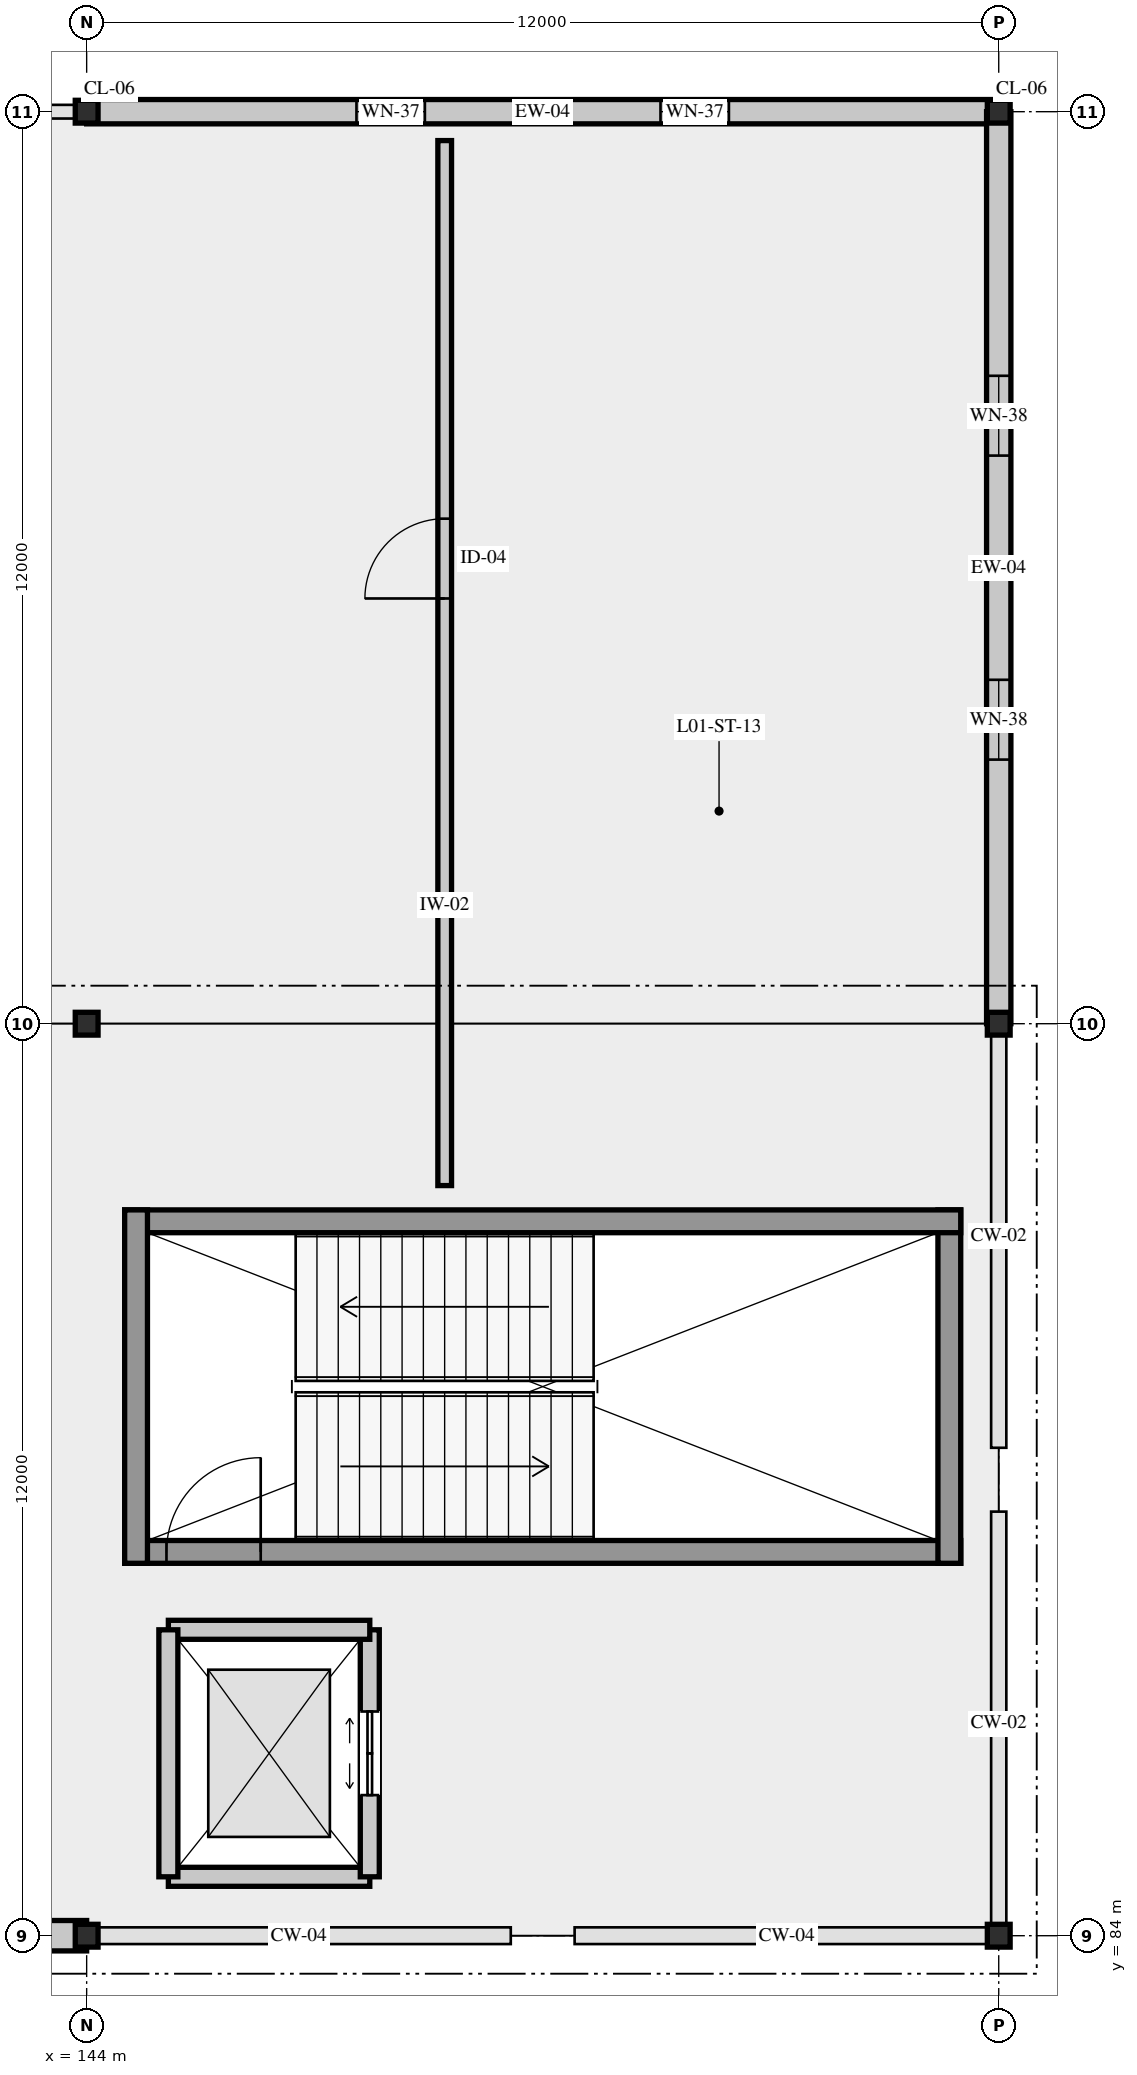
"""IFC4 building model, lengths in metres.
Left out: names, types, materials, properties, quantities, classifications, styles, units other than length and angle.
Written with IfcOpenShell. Run it as: python <this file> out.ifc"""

import sys

from ifc_helpers import new_model, si_unit, direction, frame, frame_2d, origin, origin_2d, place, context, subcontext, project, spatial, rectangle, i_section, extrude, element, fill, save


model = new_model("IFC4")
c1 = context("Model", 3, precision=1e-05, world=origin(), true_north=direction((0.0, 1.0)))
c2 = subcontext(c1, "Body", "Model", "MODEL_VIEW")
j1 = project(units=[si_unit("LENGTHUNIT", "METRE"), si_unit("PLANEANGLEUNIT", "RADIAN")], contexts=[c1])
p1 = place(None, origin())
s1 = spatial("IfcSite", under=j1, at=p1, CompositionType="ELEMENT")
p2 = place(p1, origin())
s2 = spatial("IfcBuilding", under=s1, at=p2, CompositionType="ELEMENT")
p3 = place(p2, frame((0.0, 0.0, 5.4)))
s3 = spatial("IfcBuildingStorey", under=s2, at=p3, CompositionType="ELEMENT", Elevation=5.4)
for number, where, z_axis, x_axis in (
    (1, (144.0, 84.0, 0.0), (0.0, 0.0, 1.0), (1.0, 0.0, 0.0)),
    (2, (144.0, 96.0, 0.0), (0.0, 0.0, 1.0), (1.0, 0.0, 0.0)),
    (3, (144.0, 108.0, 0.0), (0.0, 0.0, 1.0), (1.0, 0.0, 0.0)),
    (4, (156.0, 84.0, 0.0), (0.0, 0.0, 1.0), (1.0, 0.0, 0.0)),
    (5, (156.0, 96.0, 0.0), (0.0, 0.0, 1.0), (1.0, 0.0, 0.0)),
    (6, (156.0, 108.0, 0.0), (0.0, 0.0, 1.0), (1.0, 0.0, 0.0)),
):
    element("IfcColumn", number, at=place(p3, frame(where, z_axis=z_axis, x_axis=x_axis)), inside=s3, PredefinedType="COLUMN", context=c2, shape_type="SweptSolid", body=[
        extrude(i_section(OverallWidth=0.3, OverallDepth=0.3, WebThickness=0.011, FlangeThickness=0.019, FilletRadius=0.027, at=origin_2d()), origin(), (0.0, 0.0, 1.0), 5.4),
    ])
p4 = place(p3, frame((132.0, 84.0, 0.0), z_axis=(0.0, 0.0, 1.0), x_axis=(1.0, 0.0, 0.0)))
e7 = element("IfcWall", 7, at=p4, inside=s3, PredefinedType="SOLIDWALL", context=c2, shape_type="SweptSolid", body=[
    extrude(rectangle(XDim=12.0, YDim=0.4, at=frame_2d((6.0, 0.0))), origin(), (0.0, 0.0, 1.0), 4.53),
])
p5 = place(p4, frame((4.5, 0.0, 0.95)))
e8 = element("IfcOpeningElement", 8, at=p5, cuts=e7, PredefinedType="OPENING", context=c2, shape_type="SweptSolid", body=[
    extrude(rectangle(XDim=3.0, YDim=2.1, at=frame_2d((1.5, 1.05))), frame((0.0, 0.21, 0.0), z_axis=(0.0, -1.0, 0.0), x_axis=(1.0, 0.0, 0.0)), (0.0, 0.0, 1.0), 0.42),
])
p6 = place(p3, frame((156.0, 108.0, 0.0), z_axis=(0.0, 0.0, 1.0), x_axis=(-1.0, 0.0, 0.0)))
e9 = element("IfcWall", 9, at=p6, inside=s3, PredefinedType="SOLIDWALL", context=c2, shape_type="SweptSolid", body=[
    extrude(rectangle(XDim=12.0, YDim=0.32, at=frame_2d((6.0, 0.0))), origin(), (0.0, 0.0, 1.0), 4.53),
])
p7 = place(p6, frame((3.55, 0.0, 0.95)))
e10 = element("IfcOpeningElement", 10, at=p7, cuts=e9, PredefinedType="OPENING", context=c2, shape_type="SweptSolid", body=[
    extrude(rectangle(XDim=0.9, YDim=2.4, at=frame_2d((0.45, 1.2))), frame((0.0, 0.17, 0.0), z_axis=(0.0, -1.0, 0.0), x_axis=(1.0, 0.0, 0.0)), (0.0, 0.0, 1.0), 0.34),
])
p8 = place(p6, frame((7.55, 0.0, 0.95)))
e11 = element("IfcOpeningElement", 11, at=p8, cuts=e9, PredefinedType="OPENING", context=c2, shape_type="SweptSolid", body=[
    extrude(rectangle(XDim=0.9, YDim=2.4, at=frame_2d((0.45, 1.2))), frame((0.0, 0.17, 0.0), z_axis=(0.0, -1.0, 0.0), x_axis=(1.0, 0.0, 0.0)), (0.0, 0.0, 1.0), 0.34),
])
p9 = place(p3, frame((156.0, 96.0, 0.0), z_axis=(0.0, 0.0, 1.0), x_axis=(0.0, 1.0, 0.0)))
e12 = element("IfcWall", 12, at=p9, inside=s3, PredefinedType="SOLIDWALL", context=c2, shape_type="SweptSolid", body=[
    extrude(rectangle(XDim=12.0, YDim=0.32, at=frame_2d((6.0, 0.0))), origin(), (0.0, 0.0, 1.0), 4.53),
])
p10 = place(p9, frame((3.475, 0.0, 0.95)))
e13 = element("IfcOpeningElement", 13, at=p10, cuts=e12, PredefinedType="OPENING", context=c2, shape_type="SweptSolid", body=[
    extrude(rectangle(XDim=1.05, YDim=2.4, at=frame_2d((0.525, 1.2))), frame((0.0, 0.17, 0.0), z_axis=(0.0, -1.0, 0.0), x_axis=(1.0, 0.0, 0.0)), (0.0, 0.0, 1.0), 0.34),
])
p11 = place(p9, frame((7.475, 0.0, 0.95)))
e14 = element("IfcOpeningElement", 14, at=p11, cuts=e12, PredefinedType="OPENING", context=c2, shape_type="SweptSolid", body=[
    extrude(rectangle(XDim=1.05, YDim=2.4, at=frame_2d((0.525, 1.2))), frame((0.0, 0.17, 0.0), z_axis=(0.0, -1.0, 0.0), x_axis=(1.0, 0.0, 0.0)), (0.0, 0.0, 1.0), 0.34),
])
p12 = place(p3, frame((144.5, 89.05, 0.0), z_axis=(0.0, 0.0, 1.0), x_axis=(1.0, 0.0, 0.0)))
e15 = element("IfcWall", 15, at=p12, inside=s3, PredefinedType="SHEAR", context=c2, shape_type="SweptSolid", body=[
    extrude(rectangle(XDim=11.0, YDim=0.3, at=frame_2d((5.5, 0.0))), origin(), (0.0, 0.0, 1.0), 5.11),
])
p13 = place(p12, frame((0.55, 0.0, 0.0)))
e16 = element("IfcOpeningElement", 16, at=p13, cuts=e15, PredefinedType="OPENING", context=c2, shape_type="SweptSolid", body=[
    extrude(rectangle(XDim=1.24, YDim=2.25, at=frame_2d((0.62, 1.125))), frame((0.0, 0.16, 0.0), z_axis=(0.0, -1.0, 0.0), x_axis=(1.0, 0.0, 0.0)), (0.0, 0.0, 1.0), 0.32),
])
p14 = place(p3, frame((155.35, 88.9, 0.0), z_axis=(0.0, 0.0, 1.0), x_axis=(0.0, 1.0, 0.0)))
e17 = element("IfcWall", 17, at=p14, inside=s3, PredefinedType="SHEAR", context=c2, shape_type="SweptSolid", body=[
    extrude(rectangle(XDim=4.65, YDim=0.3, at=frame_2d((2.325, 0.0))), origin(), (0.0, 0.0, 1.0), 5.11),
])
p15 = place(p3, frame((155.5, 93.4, 0.0), z_axis=(0.0, 0.0, 1.0), x_axis=(-1.0, 0.0, 0.0)))
e18 = element("IfcWall", 18, at=p15, inside=s3, PredefinedType="SHEAR", context=c2, shape_type="SweptSolid", body=[
    extrude(rectangle(XDim=11.0, YDim=0.3, at=frame_2d((5.5, 0.0))), origin(), (0.0, 0.0, 1.0), 5.11),
])
p16 = place(p3, frame((144.65, 93.55, 0.0), z_axis=(0.0, 0.0, 1.0), x_axis=(0.0, -1.0, 0.0)))
e19 = element("IfcWall", 19, at=p16, inside=s3, PredefinedType="SHEAR", context=c2, shape_type="SweptSolid", body=[
    extrude(rectangle(XDim=4.65, YDim=0.3, at=frame_2d((2.325, 0.0))), origin(), (0.0, 0.0, 1.0), 5.11),
])
p17 = place(p3, frame((145.075, 84.775, 0.0), z_axis=(0.0, 0.0, 1.0), x_axis=(1.0, 0.0, 0.0)))
e20 = element("IfcWall", 20, at=p17, inside=s3, PredefinedType="SOLIDWALL", context=c2, shape_type="SweptSolid", body=[
    extrude(rectangle(XDim=2.65, YDim=0.25, at=frame_2d((1.325, 0.0))), origin(), (0.0, 0.0, 1.0), 5.11),
])
p18 = place(p3, frame((147.725, 84.775, 0.0), z_axis=(0.0, 0.0, 1.0), x_axis=(0.0, 1.0, 0.0)))
e21 = element("IfcWall", 21, at=p18, inside=s3, PredefinedType="SOLIDWALL", context=c2, shape_type="SweptSolid", body=[
    extrude(rectangle(XDim=3.25, YDim=0.25, at=frame_2d((1.625, 0.0))), origin(), (0.0, 0.0, 1.0), 5.11),
])
p19 = place(p18, frame((1.075, 0.0, 0.0)))
e22 = element("IfcOpeningElement", 22, at=p19, cuts=e21, PredefinedType="OPENING", context=c2, shape_type="SweptSolid", body=[
    extrude(rectangle(XDim=1.1, YDim=2.2, at=frame_2d((0.55, 1.1))), frame((0.0, 0.135, 0.0), z_axis=(0.0, -1.0, 0.0), x_axis=(1.0, 0.0, 0.0)), (0.0, 0.0, 1.0), 0.27),
])
p20 = place(p3, frame((147.725, 88.025, 0.0), z_axis=(0.0, 0.0, 1.0), x_axis=(-1.0, 0.0, 0.0)))
e23 = element("IfcWall", 23, at=p20, inside=s3, PredefinedType="SOLIDWALL", context=c2, shape_type="SweptSolid", body=[
    extrude(rectangle(XDim=2.65, YDim=0.25, at=frame_2d((1.325, 0.0))), origin(), (0.0, 0.0, 1.0), 5.11),
])
p21 = place(p3, frame((145.075, 88.025, 0.0), z_axis=(0.0, 0.0, 1.0), x_axis=(0.0, -1.0, 0.0)))
e24 = element("IfcWall", 24, at=p21, inside=s3, PredefinedType="SOLIDWALL", context=c2, shape_type="SweptSolid", body=[
    extrude(rectangle(XDim=3.25, YDim=0.25, at=frame_2d((1.625, 0.0))), origin(), (0.0, 0.0, 1.0), 5.11),
])
p22 = place(p3, frame((148.711, 93.87, 0.0), z_axis=(0.0, 0.0, 1.0), x_axis=(0.0, 1.0, 0.0)))
e25 = element("IfcWall", 25, at=p22, inside=s3, PredefinedType="PARTITIONING", context=c2, shape_type="SweptSolid", body=[
    extrude(rectangle(XDim=13.75, YDim=0.18, at=frame_2d((6.875, 0.0))), origin(), (0.0, 0.0, 1.0), 4.55),
])
p23 = place(p22, frame((7.725, 0.0, 0.0)))
e26 = element("IfcOpeningElement", 26, at=p23, cuts=e25, PredefinedType="OPENING", context=c2, shape_type="SweptSolid", body=[
    extrude(rectangle(XDim=1.05, YDim=2.2, at=frame_2d((0.525, 1.1))), frame((0.0, 0.1, 0.0), z_axis=(0.0, -1.0, 0.0), x_axis=(1.0, 0.0, 0.0)), (0.0, 0.0, 1.0), 0.2),
])
p24 = place(p7, origin())
e27 = element("IfcWindow", 27, at=p24, inside=s3, PartitioningType="SINGLE_PANEL", PredefinedType="WINDOW", context=c2, shape_type="SweptSolid", body=[
    extrude(rectangle(XDim=0.9, YDim=2.4, at=frame_2d((0.45, 1.2))), frame((0.0, 0.03, 0.0), z_axis=(0.0, -1.0, 0.0), x_axis=(1.0, 0.0, 0.0)), (0.0, 0.0, 1.0), 0.06),
])
fill(e10, e27)
p25 = place(p8, origin())
e28 = element("IfcWindow", 28, at=p25, inside=s3, PartitioningType="SINGLE_PANEL", PredefinedType="WINDOW", context=c2, shape_type="SweptSolid", body=[
    extrude(rectangle(XDim=0.9, YDim=2.4, at=frame_2d((0.45, 1.2))), frame((0.0, 0.03, 0.0), z_axis=(0.0, -1.0, 0.0), x_axis=(1.0, 0.0, 0.0)), (0.0, 0.0, 1.0), 0.06),
])
fill(e11, e28)
p26 = place(p10, origin())
e29 = element("IfcWindow", 29, at=p26, inside=s3, PartitioningType="SINGLE_PANEL", PredefinedType="WINDOW", context=c2, shape_type="SweptSolid", body=[
    extrude(rectangle(XDim=1.05, YDim=2.4, at=frame_2d((0.525, 1.2))), frame((0.0, 0.03, 0.0), z_axis=(0.0, -1.0, 0.0), x_axis=(1.0, 0.0, 0.0)), (0.0, 0.0, 1.0), 0.06),
])
fill(e13, e29)
p27 = place(p11, origin())
e30 = element("IfcWindow", 30, at=p27, inside=s3, PartitioningType="SINGLE_PANEL", PredefinedType="WINDOW", context=c2, shape_type="SweptSolid", body=[
    extrude(rectangle(XDim=1.05, YDim=2.4, at=frame_2d((0.525, 1.2))), frame((0.0, 0.03, 0.0), z_axis=(0.0, -1.0, 0.0), x_axis=(1.0, 0.0, 0.0)), (0.0, 0.0, 1.0), 0.06),
])
fill(e14, e30)
p28 = place(p13, origin())
e31 = element("IfcDoor", 31, at=p28, inside=s3, OperationType="SINGLE_SWING_RIGHT", PredefinedType="DOOR", context=c2, shape_type="SweptSolid", body=[
    extrude(rectangle(XDim=1.24, YDim=2.25, at=frame_2d((0.62, 1.125))), frame((0.0, 0.025, 0.0), z_axis=(0.0, -1.0, 0.0), x_axis=(1.0, 0.0, 0.0)), (0.0, 0.0, 1.0), 0.05),
])
fill(e16, e31)
p29 = place(p19, origin())
e32 = element("IfcDoor", 32, at=p29, inside=s3, OperationType="SLIDING_TO_LEFT", PredefinedType="DOOR", context=c2, shape_type="SweptSolid", body=[
    extrude(rectangle(XDim=1.1, YDim=2.2, at=frame_2d((0.55, 1.1))), frame((0.0, 0.025, 0.0), z_axis=(0.0, -1.0, 0.0), x_axis=(1.0, 0.0, 0.0)), (0.0, 0.0, 1.0), 0.05),
])
fill(e22, e32)
p30 = place(p23, origin())
e33 = element("IfcDoor", 33, at=p30, inside=s3, OperationType="SINGLE_SWING_LEFT", PredefinedType="DOOR", context=c2, shape_type="SweptSolid", body=[
    extrude(rectangle(XDim=1.05, YDim=2.2, at=frame_2d((0.525, 1.1))), frame((0.0, 0.025, 0.0), z_axis=(0.0, -1.0, 0.0), x_axis=(1.0, 0.0, 0.0)), (0.0, 0.0, 1.0), 0.05),
])
fill(e26, e33)
save(model, sys.argv[1])
